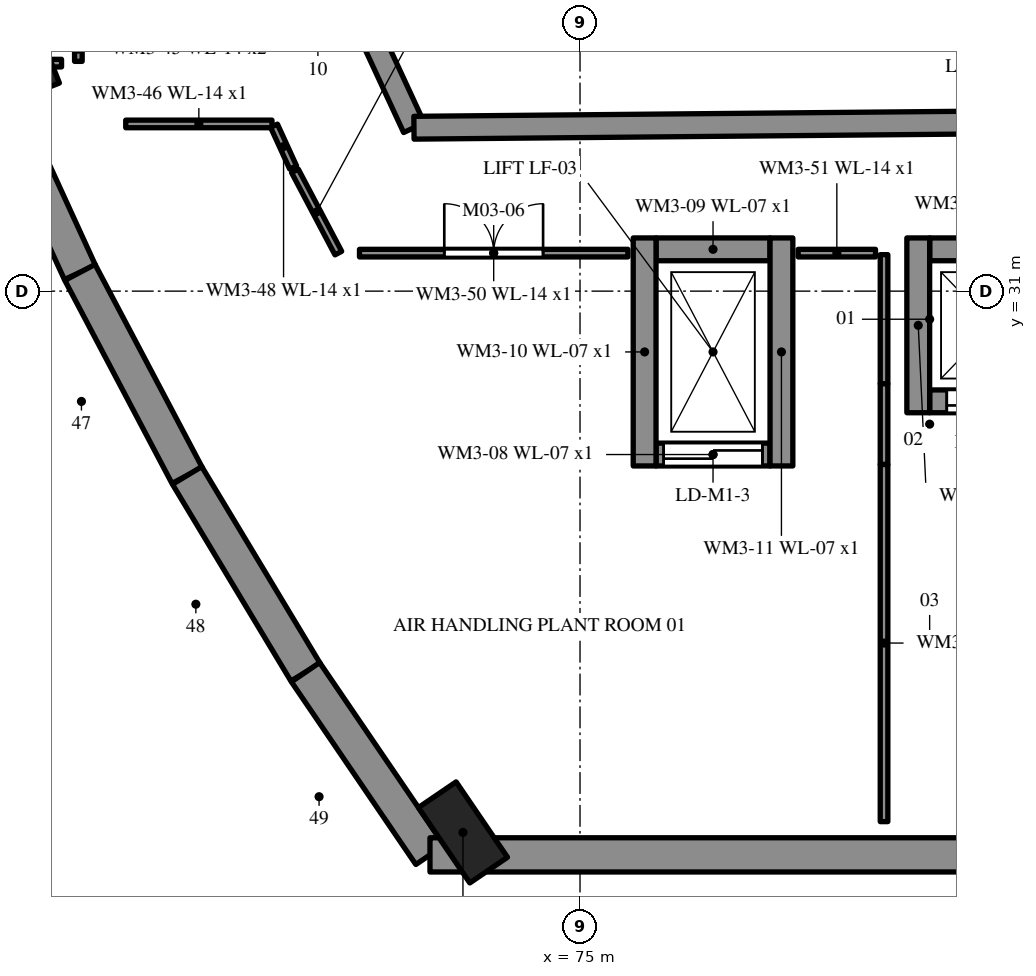
"""IFC4 building model, lengths in metres.
Left out: names, types, materials, properties, quantities, classifications, styles, units other than length and angle.
Written with IfcOpenShell. Run it as: python <this file> out.ifc"""

import sys

from ifc_helpers import new_model, si_unit, direction, frame, frame_2d, origin, origin_2d, place, context, subcontext, project, spatial, polyline, rectangle, outline, extrude, element, fill, save


model = new_model("IFC4")
c1 = context("Model", 3, precision=1e-05, world=origin(), true_north=direction((0.0, 1.0)))
c2 = subcontext(c1, "Body", "Model", "MODEL_VIEW")
j1 = project(units=[si_unit("LENGTHUNIT", "METRE"), si_unit("PLANEANGLEUNIT", "RADIAN")], contexts=[c1])
p1 = place(None, origin())
s1 = spatial("IfcSite", under=j1, at=p1, CompositionType="ELEMENT")
p2 = place(p1, origin())
s2 = spatial("IfcBuilding", under=s1, at=p2, CompositionType="ELEMENT")
p3 = place(p2, frame((0.0, 0.0, 14.8)))
s3 = spatial("IfcBuildingStorey", under=s2, at=p3, CompositionType="ELEMENT", Elevation=14.8)
p4 = place(p3, frame((67.163, 33.993, 0.0), z_axis=(0.0, 0.0, 1.0), x_axis=(0.416407051835, -0.909178292296, 0.0)))
e1 = element("IfcWall", 1, at=p4, inside=s3, PredefinedType="SOLIDWALL", context=c2, shape_type="SweptSolid", body=[
    extrude(outline(polyline([(0.0, 0.0), (3.021, 0.0), (3.021, 2.921), (2.963, 2.944), (0.203, 3.766), (0.1, 3.796), (0.0, 3.826), (0.0, 0.0)])), frame((0.0, 0.225, 0.0), z_axis=(0.0, -1.0, 0.0), x_axis=(1.0, 0.0, 0.0)), (0.0, 0.0, 1.0), 0.45),
])
p5 = place(p3, frame((68.421, 31.246, 0.0), z_axis=(0.0, 0.0, 1.0), x_axis=(0.466728769487, -0.884400506407, 0.0)))
e2 = element("IfcWall", 2, at=p5, inside=s3, PredefinedType="SOLIDWALL", context=c2, shape_type="SweptSolid", body=[
    extrude(outline(polyline([(0.0, 0.0), (3.021, 0.0), (3.021, 2.041), (2.994, 2.034), (0.072, 2.896), (0.0, 2.917), (0.0, 0.0)])), frame((0.0, 0.225, 0.0), z_axis=(0.0, -1.0, 0.0), x_axis=(1.0, 0.0, 0.0)), (0.0, 0.0, 1.0), 0.45),
])
p6 = place(p3, frame((69.831, 28.575, 0.0), z_axis=(0.0, 0.0, 1.0), x_axis=(0.515636119523, -0.856807675177, 0.0)))
e3 = element("IfcWall", 3, at=p6, inside=s3, PredefinedType="SOLIDWALL", context=c2, shape_type="SweptSolid", body=[
    extrude(outline(polyline([(0.0, 0.0), (3.021, 0.0), (3.021, 2.945), (0.0, 2.045), (0.0, 0.0)])), frame((0.0, 0.225, 0.0), z_axis=(0.0, -1.0, 0.0), x_axis=(1.0, 0.0, 0.0)), (0.0, 0.0, 1.0), 0.45),
])
p7 = place(p3, frame((71.389, 25.986, 0.0), z_axis=(0.0, 0.0, 1.0), x_axis=(0.5629642644, -0.826481238147, 0.0)))
e4 = element("IfcWall", 4, at=p7, inside=s3, PredefinedType="SOLIDWALL", context=c2, shape_type="SweptSolid", body=[
    extrude(outline(polyline([(0.0, 0.0), (2.908, 0.0), (2.908, 3.849), (2.859, 3.834), (2.786, 3.811), (0.0, 2.949), (0.0, 0.0)])), frame((0.0, 0.225, 0.0), z_axis=(0.0, -1.0, 0.0), x_axis=(1.0, 0.0, 0.0)), (0.0, 0.0, 1.0), 0.45),
])
p8 = place(p3, frame((73.026, 23.583, 0.0), z_axis=(0.0, 0.0, 1.0), x_axis=(1.0, 0.0, 0.0)))
e5 = element("IfcWall", 5, at=p8, inside=s3, PredefinedType="SOLIDWALL", context=c2, shape_type="SweptSolid", body=[
    extrude(outline(polyline([(0.0, 0.0), (21.948, 0.0), (21.948, 3.808), (21.824, 3.808), (21.587, 3.808), (0.361, 3.808), (0.114, 3.808), (0.0, 3.808), (0.0, 0.0)])), frame((0.0, 0.225, 0.0), z_axis=(0.0, -1.0, 0.0), x_axis=(1.0, 0.0, 0.0)), (0.0, 0.0, 1.0), 0.45),
])
p9 = place(p3, frame((71.558, 35.865, 0.0), z_axis=(0.0, 0.0, 1.0), x_axis=(0.420315192535, -0.907378167538, 0.0)))
e6 = element("IfcWall", 6, at=p9, inside=s3, PredefinedType="SHEAR", context=c2, shape_type="SweptSolid", body=[
    extrude(outline(polyline([(0.0, 0.0), (2.992, 0.0), (2.992, 5.785), (2.232, 6.01), (2.162, 6.03), (2.093, 6.051), (2.032, 6.068), (1.963, 6.09), (1.893, 6.066), (0.2, 5.482), (0.102, 5.448), (0.0, 5.412), (0.0, 0.0)])), frame((0.0, 0.15, 0.0), z_axis=(0.0, -1.0, 0.0), x_axis=(1.0, 0.0, 0.0)), (0.0, 0.0, 1.0), 0.3),
])
p10 = place(p3, frame((72.815, 33.15, 0.0), z_axis=(0.0, 0.0, 1.0), x_axis=(0.999957788763, 0.009188073348, 0.0)))
e7 = element("IfcWall", 7, at=p10, inside=s3, PredefinedType="SHEAR", context=c2, shape_type="SweptSolid", body=[
    extrude(outline(polyline([(0.0, 0.0), (22.479, 0.0), (22.479, 5.858), (15.985, 8.528), (15.177, 8.853), (14.37, 9.179), (13.458, 9.548), (13.076, 9.791), (12.695, 10.024), (12.567, 10.103), (12.335, 10.244), (12.236, 10.303), (12.081, 10.37), (11.991, 10.369), (11.926, 10.369), (11.836, 10.368), (11.681, 10.367), (10.683, 10.361), (10.522, 10.36), (10.433, 10.359), (10.361, 10.359), (10.243, 10.358), (10.111, 10.29), (10.002, 10.224), (9.76, 10.078), (9.604, 9.978), (9.201, 9.734), (8.798, 9.479), (7.653, 9.004), (6.754, 8.631), (5.855, 8.258), (0.0, 5.797), (0.0, 0.0)])), frame((0.0, 0.15, 0.0), z_axis=(0.0, -1.0, 0.0), x_axis=(1.0, 0.0, 0.0)), (0.0, 0.0, 1.0), 0.3),
])
p11 = place(p3, frame((73.46, 23.878, 0.0), z_axis=(0.0, 0.0, 1.0), x_axis=(0.562978035902, -0.82647185741, 0.0)))
e8 = element("IfcColumn", 8, at=p11, inside=s3, PredefinedType="PILASTER", context=c2, shape_type="SweptSolid", body=[
    extrude(rectangle(XDim=1.2, YDim=0.6, at=origin_2d()), origin(), (0.0, 0.0, 1.0), 3.066),
])
p12 = place(p3, frame((67.651, 34.186, 0.0), z_axis=(0.0, 0.0, 1.0), x_axis=(0.366955870742, -0.930238350601, 0.0)))
e9 = element("IfcColumn", 9, at=p12, inside=s3, PredefinedType="PILASTER", context=c2, shape_type="SweptSolid", body=[
    extrude(rectangle(XDim=1.2, YDim=0.6, at=origin_2d()), origin(), (0.0, 0.0, 1.0), 3.06),
])
p13 = place(p3, frame((76.0, 28.85, 0.0), z_axis=(0.0, 0.0, 1.0), x_axis=(1.0, 0.0, 0.0)))
e10 = element("IfcWall", 10, at=p13, inside=s3, PredefinedType="SHEAR", context=c2, shape_type="SweptSolid", body=[
    extrude(rectangle(XDim=1.5, YDim=0.3, at=frame_2d((0.75, 0.0))), origin(), (0.0, 0.0, 1.0), 4.2),
])
p14 = place(p13, frame((0.1, 0.0, 0.0)))
e11 = element("IfcOpeningElement", 11, at=p14, cuts=e10, PredefinedType="OPENING", context=c2, shape_type="SweptSolid", body=[
    extrude(rectangle(XDim=1.3, YDim=2.3, at=frame_2d((0.65, 1.15))), frame((0.0, 0.16, 0.0), z_axis=(0.0, -1.0, 0.0), x_axis=(1.0, 0.0, 0.0)), (0.0, 0.0, 1.0), 0.32),
])
p15 = place(p3, frame((77.5, 31.55, 0.0), z_axis=(0.0, 0.0, 1.0), x_axis=(-1.0, 0.0, 0.0)))
e12 = element("IfcWall", 12, at=p15, inside=s3, PredefinedType="SHEAR", context=c2, shape_type="SweptSolid", body=[
    extrude(rectangle(XDim=1.5, YDim=0.3, at=frame_2d((0.75, 0.0))), origin(), (0.0, 0.0, 1.0), 4.2),
])
for number, where, z_axis, x_axis in (
    (13, (75.85, 31.7, 0.0), (0.0, 0.0, 1.0), (0.0, -1.0, 0.0)),
    (14, (77.65, 28.7, 0.0), (0.0, 0.0, 1.0), (0.0, 1.0, 0.0)),
):
    element("IfcWall", number, at=place(p3, frame(where, z_axis=z_axis, x_axis=x_axis)), inside=s3, PredefinedType="SHEAR", context=c2, shape_type="SweptSolid", body=[
        extrude(rectangle(XDim=3.0, YDim=0.3, at=frame_2d((1.5, 0.0))), origin(), (0.0, 0.0, 1.0), 4.2),
    ])
p16 = place(p3, frame((79.6, 29.55, 0.0), z_axis=(0.0, 0.0, 1.0), x_axis=(1.0, 0.0, 0.0)))
e15 = element("IfcWall", 15, at=p16, inside=s3, PredefinedType="SHEAR", context=c2, shape_type="SweptSolid", body=[
    extrude(rectangle(XDim=1.65, YDim=0.3, at=frame_2d((0.825, 0.0))), origin(), (0.0, 0.0, 1.0), 4.2),
])
p17 = place(p16, frame((0.225, 0.0, 0.0)))
e16 = element("IfcOpeningElement", 16, at=p17, cuts=e15, PredefinedType="OPENING", context=c2, shape_type="SweptSolid", body=[
    extrude(rectangle(XDim=1.2, YDim=2.2, at=frame_2d((0.6, 1.1))), frame((0.0, 0.16, 0.0), z_axis=(0.0, -1.0, 0.0), x_axis=(1.0, 0.0, 0.0)), (0.0, 0.0, 1.0), 0.32),
])
p18 = place(p3, frame((81.25, 31.55, 0.0), z_axis=(0.0, 0.0, 1.0), x_axis=(-1.0, 0.0, 0.0)))
e17 = element("IfcWall", 17, at=p18, inside=s3, PredefinedType="SHEAR", context=c2, shape_type="SweptSolid", body=[
    extrude(rectangle(XDim=1.65, YDim=0.3, at=frame_2d((0.825, 0.0))), origin(), (0.0, 0.0, 1.0), 4.2),
])
p19 = place(p3, frame((79.45, 31.7, 0.0), z_axis=(0.0, 0.0, 1.0), x_axis=(0.0, -1.0, 0.0)))
e18 = element("IfcWall", 18, at=p19, inside=s3, PredefinedType="SHEAR", context=c2, shape_type="SweptSolid", body=[
    extrude(rectangle(XDim=2.3, YDim=0.3, at=frame_2d((1.15, 0.0))), origin(), (0.0, 0.0, 1.0), 4.2),
])
p20 = place(p3, frame((68.179, 34.0, 0.0), z_axis=(0.0, 0.0, 1.0), x_axis=(-1.0, 0.0, 0.0)))
e19 = element("IfcWall", 19, at=p20, inside=s3, PredefinedType="PARTITIONING", context=c2, shape_type="SweptSolid", body=[
    extrude(rectangle(XDim=0.731, YDim=0.1, at=frame_2d((0.366, 0.0))), origin(), (0.0, 0.0, 1.0), 2.075),
])
p21 = place(p3, frame((68.4, 34.343, 0.0), z_axis=(0.0, 0.0, 1.0), x_axis=(0.0, -1.0, 0.0)))
e20 = element("IfcWall", 20, at=p21, inside=s3, PredefinedType="PARTITIONING", context=c2, shape_type="SweptSolid", body=[
    extrude(rectangle(XDim=0.32, YDim=0.1, at=frame_2d((0.16, 0.0))), origin(), (0.0, 0.0, 1.0), 2.075),
])
p22 = place(p3, frame((69.023, 33.2, 0.0), z_axis=(0.0, 0.0, 1.0), x_axis=(1.0, 0.0, 0.0)))
e21 = element("IfcWall", 21, at=p22, inside=s3, PredefinedType="PARTITIONING", context=c2, shape_type="SweptSolid", body=[
    extrude(outline(polyline([(0.0, 0.0), (1.924, 0.0), (1.924, 5.073), (1.649, 4.959), (1.374, 4.844), (1.1, 4.73), (0.825, 4.616), (0.55, 4.501), (0.275, 4.387), (0.0, 4.273), (0.0, 0.0)])), frame((0.0, 0.05, 0.0), z_axis=(0.0, -1.0, 0.0), x_axis=(1.0, 0.0, 0.0)), (0.0, 0.0, 1.0), 0.1),
])
p23 = place(p3, frame((70.974, 33.177, 0.0), z_axis=(0.0, 0.0, 1.0), x_axis=(0.416055955945, -0.909339013527, 0.0)))
e22 = element("IfcWall", 22, at=p23, inside=s3, PredefinedType="PARTITIONING", context=c2, shape_type="SweptSolid", body=[
    extrude(outline(polyline([(0.0, 0.0), (0.604, 0.0), (0.614, 4.892), (0.307, 4.984), (0.0, 5.075), (0.0, 0.0)])), frame((0.0, 0.05, 0.0), z_axis=(0.0, -1.0, 0.0), x_axis=(1.0, 0.0, 0.0)), (0.0, 0.0, 1.0), 0.1),
])
p24 = place(p3, frame((71.249, 32.583, 0.0), z_axis=(0.0, 0.0, 1.0), x_axis=(0.466970962101, -0.884272650575, 0.0)))
e23 = element("IfcWall", 23, at=p24, inside=s3, PredefinedType="PARTITIONING", context=c2, shape_type="SweptSolid", body=[
    extrude(outline(polyline([(0.0, 0.0), (1.224, 0.0), (1.224, 4.541), (0.918, 4.632), (0.612, 4.717), (0.306, 4.798), (0.0, 4.879), (0.0, 0.0)])), frame((0.0, 0.05, 0.0), z_axis=(0.0, -1.0, 0.0), x_axis=(1.0, 0.0, 0.0)), (0.0, 0.0, 1.0), 0.1),
])
p25 = place(p3, frame((72.098, 31.5, 0.0), z_axis=(0.0, 0.0, 1.0), x_axis=(1.0, 0.0, 0.0)))
e24 = element("IfcWall", 24, at=p25, inside=s3, PredefinedType="PARTITIONING", context=c2, shape_type="SweptSolid", body=[
    extrude(outline(polyline([(0.0, 0.0), (3.531, 0.0), (3.531, 6.102), (3.279, 5.999), (3.027, 5.895), (2.775, 5.792), (2.522, 5.689), (2.27, 5.585), (2.018, 5.482), (1.766, 5.378), (1.513, 5.275), (1.261, 5.172), (1.009, 5.068), (0.757, 4.965), (0.504, 4.862), (0.252, 4.758), (0.0, 4.655), (0.0, 0.0)])), frame((0.0, 0.05, 0.0), z_axis=(0.0, -1.0, 0.0), x_axis=(1.0, 0.0, 0.0)), (0.0, 0.0, 1.0), 0.1),
])
p26 = place(p25, frame((1.116, 0.0, 0.0)))
e25 = element("IfcOpeningElement", 25, at=p26, cuts=e24, PredefinedType="OPENING", context=c2, shape_type="SweptSolid", body=[
    extrude(rectangle(XDim=1.3, YDim=2.1, at=frame_2d((0.65, 1.05))), frame((0.0, 0.06, 0.0), z_axis=(0.0, -1.0, 0.0), x_axis=(1.0, 0.0, 0.0)), (0.0, 0.0, 1.0), 0.12),
])
p27 = place(p3, frame((77.87, 31.5, 0.0), z_axis=(0.0, 0.0, 1.0), x_axis=(1.0, 0.0, 0.0)))
e26 = element("IfcWall", 26, at=p27, inside=s3, PredefinedType="PARTITIONING", context=c2, shape_type="SweptSolid", body=[
    extrude(outline(polyline([(0.0, 0.0), (1.018, 0.0), (1.018, 7.732), (0.763, 7.576), (0.509, 7.42), (0.254, 7.264), (0.0, 7.108), (0.0, 0.0)])), frame((0.0, 0.05, 0.0), z_axis=(0.0, -1.0, 0.0), x_axis=(1.0, 0.0, 0.0)), (0.0, 0.0, 1.0), 0.1),
])
p28 = place(p3, frame((79.0, 31.48, 0.0), z_axis=(0.0, 0.0, 1.0), x_axis=(0.0, -1.0, 0.0)))
e27 = element("IfcWall", 27, at=p28, inside=s3, PredefinedType="PARTITIONING", context=c2, shape_type="SweptSolid", body=[
    extrude(outline(polyline([(0.0, 0.0), (1.699, 0.0), (1.699, 7.749), (1.416, 7.759), (1.133, 7.77), (0.85, 7.78), (0.566, 7.788), (0.283, 7.794), (0.0, 7.8), (0.0, 0.0)])), frame((0.0, 0.05, 0.0), z_axis=(0.0, -1.0, 0.0), x_axis=(1.0, 0.0, 0.0)), (0.0, 0.0, 1.0), 0.1),
])
p29 = place(p3, frame((79.0, 29.781, 0.0), z_axis=(0.0, 0.0, 1.0), x_axis=(0.0, -1.0, 0.0)))
e28 = element("IfcWall", 28, at=p29, inside=s3, PredefinedType="PARTITIONING", context=c2, shape_type="SweptSolid", body=[
    extrude(rectangle(XDim=1.062, YDim=0.1, at=frame_2d((0.531, 0.0))), origin(), (0.0, 0.0, 1.0), 2.008),
])
p30 = place(p3, frame((79.0, 28.719, 0.0), z_axis=(0.0, 0.0, 1.0), x_axis=(0.0, -1.0, 0.0)))
e29 = element("IfcWall", 29, at=p30, inside=s3, PredefinedType="PARTITIONING", context=c2, shape_type="SweptSolid", body=[
    extrude(outline(polyline([(0.0, 0.0), (4.699, 0.0), (4.699, 4.203), (4.438, 4.379), (4.177, 4.555), (3.916, 4.73), (3.655, 4.906), (3.394, 5.081), (3.133, 5.257), (2.872, 5.433), (2.611, 5.608), (2.35, 5.784), (2.089, 5.96), (1.827, 6.135), (1.566, 6.311), (1.305, 6.487), (1.044, 6.662), (0.783, 6.838), (0.522, 7.014), (0.261, 7.189), (0.0, 7.365), (0.0, 0.0)])), frame((0.0, 0.05, 0.0), z_axis=(0.0, -1.0, 0.0), x_axis=(1.0, 0.0, 0.0)), (0.0, 0.0, 1.0), 0.1),
])
p31 = place(p14, origin())
e30 = element("IfcDoor", 30, at=p31, inside=s3, OperationType="SLIDING_TO_LEFT", PredefinedType="DOOR", context=c2, shape_type="SweptSolid", body=[
    extrude(rectangle(XDim=1.3, YDim=2.3, at=frame_2d((0.65, 1.15))), frame((0.0, 0.025, 0.0), z_axis=(0.0, -1.0, 0.0), x_axis=(1.0, 0.0, 0.0)), (0.0, 0.0, 1.0), 0.05),
])
fill(e11, e30)
p32 = place(p17, origin())
e31 = element("IfcDoor", 31, at=p32, inside=s3, OperationType="SLIDING_TO_LEFT", PredefinedType="DOOR", context=c2, shape_type="SweptSolid", body=[
    extrude(rectangle(XDim=1.2, YDim=2.2, at=frame_2d((0.6, 1.1))), frame((0.0, 0.025, 0.0), z_axis=(0.0, -1.0, 0.0), x_axis=(1.0, 0.0, 0.0)), (0.0, 0.0, 1.0), 0.05),
])
fill(e16, e31)
p33 = place(p26, origin())
e32 = element("IfcDoor", 32, at=p33, inside=s3, OperationType="DOUBLE_DOOR_SINGLE_SWING", PredefinedType="DOOR", context=c2, shape_type="SweptSolid", body=[
    extrude(rectangle(XDim=1.3, YDim=2.1, at=frame_2d((0.65, 1.05))), frame((0.0, 0.025, 0.0), z_axis=(0.0, -1.0, 0.0), x_axis=(1.0, 0.0, 0.0)), (0.0, 0.0, 1.0), 0.05),
])
fill(e25, e32)
save(model, sys.argv[1])
